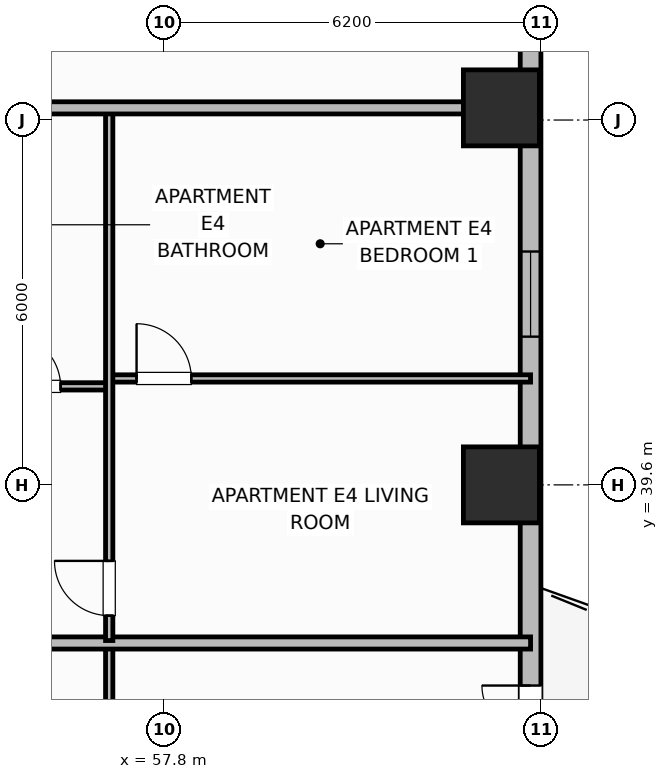
"""IFC4 building model, lengths in metres.
Left out: names, types, materials, properties, quantities, classifications, styles, units other than length and angle.
Written with IfcOpenShell. Run it as: python <this file> out.ifc"""

import sys

from ifc_helpers import new_model, si_unit, direction, frame, frame_2d, origin, origin_2d, place, context, subcontext, project, spatial, rectangle, extrude, element, fill, save


model = new_model("IFC4")
c1 = context("Model", 3, precision=1e-05, world=origin(), true_north=direction((0.0, 1.0)))
c2 = subcontext(c1, "Body", "Model", "MODEL_VIEW")
j1 = project(units=[si_unit("LENGTHUNIT", "METRE"), si_unit("PLANEANGLEUNIT", "RADIAN")], contexts=[c1])
p1 = place(None, origin())
s1 = spatial("IfcSite", under=j1, at=p1, CompositionType="ELEMENT")
p2 = place(p1, origin())
s2 = spatial("IfcBuilding", under=s1, at=p2, CompositionType="ELEMENT")
p3 = place(p2, frame((0.0, 0.0, 62.1)))
s3 = spatial("IfcBuildingStorey", under=s2, at=p3, CompositionType="ELEMENT", Elevation=62.1)
for number, where, z_axis, x_axis in (
    (1, (63.35, 39.6, 0.0), (0.0, 0.0, 1.0), (1.0, 0.0, 0.0)),
    (2, (63.35, 45.8, 0.0), (0.0, 0.0, 1.0), (1.0, 0.0, 0.0)),
):
    element("IfcColumn", number, at=place(p3, frame(where, z_axis=z_axis, x_axis=x_axis)), inside=s3, PredefinedType="COLUMN", context=c2, shape_type="SweptSolid", body=[
        extrude(rectangle(XDim=1.25, YDim=1.25, at=origin_2d()), origin(), (0.0, 0.0, 1.0), 3.7),
    ])
p4 = place(p3, frame((63.83, 32.6, 0.0), z_axis=(0.0, 0.0, 1.0), x_axis=(0.0, 1.0, 0.0)))
e3 = element("IfcWall", 3, at=p4, inside=s3, PredefinedType="SOLIDWALL", context=c2, shape_type="SweptSolid", body=[
    extrude(rectangle(XDim=14.8, YDim=0.34, at=frame_2d((7.4, 0.0))), origin(), (0.0, 0.0, 1.0), 2.7),
])
p5 = place(p4, frame((2.1, 0.0, 0.0)))
e4 = element("IfcOpeningElement", 4, at=p5, cuts=e3, PredefinedType="OPENING", context=c2, shape_type="SweptSolid", body=[
    extrude(rectangle(XDim=1.6, YDim=2.1, at=frame_2d((0.8, 1.05))), frame((0.0, 0.18, 0.0), z_axis=(0.0, -1.0, 0.0), x_axis=(1.0, 0.0, 0.0)), (0.0, 0.0, 1.0), 0.36),
])
p6 = place(p4, frame((9.438, 0.0, 0.73)))
e5 = element("IfcOpeningElement", 5, at=p6, cuts=e3, PredefinedType="OPENING", context=c2, shape_type="SweptSolid", body=[
    extrude(rectangle(XDim=1.4, YDim=1.85, at=frame_2d((0.7, 0.925))), frame((0.0, 0.18, 0.0), z_axis=(0.0, -1.0, 0.0), x_axis=(1.0, 0.0, 0.0)), (0.0, 0.0, 1.0), 0.36),
])
p7 = place(p3, frame((56.9, 26.64, 0.0), z_axis=(0.0, 0.0, 1.0), x_axis=(0.0, 1.0, 0.0)))
e6 = element("IfcWall", 6, at=p7, inside=s3, PredefinedType="PARTITIONING", context=c2, shape_type="SweptSolid", body=[
    extrude(rectangle(XDim=10.32, YDim=0.12, at=frame_2d((5.16, 0.0))), origin(), (0.0, 0.0, 1.0), 2.53),
])
p8 = place(p7, frame((0.56, 0.0, 0.0)))
e7 = element("IfcOpeningElement", 7, at=p8, cuts=e6, PredefinedType="OPENING", context=c2, shape_type="SweptSolid", body=[
    extrude(rectangle(XDim=0.9, YDim=2.1, at=frame_2d((0.45, 1.05))), frame((0.0, 0.07, 0.0), z_axis=(0.0, -1.0, 0.0), x_axis=(1.0, 0.0, 0.0)), (0.0, 0.0, 1.0), 0.14),
])
p9 = place(p3, frame((54.65, 37.0, 0.0), z_axis=(0.0, 0.0, 1.0), x_axis=(1.0, 0.0, 0.0)))
e8 = element("IfcWall", 8, at=p9, inside=s3, PredefinedType="PARTITIONING", context=c2, shape_type="SweptSolid", body=[
    extrude(rectangle(XDim=9.18, YDim=0.2, at=frame_2d((4.59, 0.0))), origin(), (0.0, 0.0, 1.0), 2.53),
])
p10 = place(p3, frame((54.65, 41.22, 0.0), z_axis=(0.0, 0.0, 1.0), x_axis=(1.0, 0.0, 0.0)))
e9 = element("IfcWall", 9, at=p10, inside=s3, PredefinedType="PARTITIONING", context=c2, shape_type="SweptSolid", body=[
    extrude(rectangle(XDim=2.25, YDim=0.12, at=frame_2d((1.125, 0.0))), origin(), (0.0, 0.0, 1.0), 2.53),
])
p11 = place(p10, frame((0.6, 0.0, 0.0)))
e10 = element("IfcOpeningElement", 10, at=p11, cuts=e9, PredefinedType="OPENING", context=c2, shape_type="SweptSolid", body=[
    extrude(rectangle(XDim=0.85, YDim=2.1, at=frame_2d((0.425, 1.05))), frame((0.0, 0.07, 0.0), z_axis=(0.0, -1.0, 0.0), x_axis=(1.0, 0.0, 0.0)), (0.0, 0.0, 1.0), 0.14),
])
p12 = place(p3, frame((56.9, 41.35, 0.0), z_axis=(0.0, 0.0, 1.0), x_axis=(1.0, 0.0, 0.0)))
e11 = element("IfcWall", 11, at=p12, inside=s3, PredefinedType="PARTITIONING", context=c2, shape_type="SweptSolid", body=[
    extrude(rectangle(XDim=6.93, YDim=0.12, at=frame_2d((3.465, 0.0))), origin(), (0.0, 0.0, 1.0), 2.53),
])
p13 = place(p12, frame((0.45, 0.0, 0.0)))
e12 = element("IfcOpeningElement", 12, at=p13, cuts=e11, PredefinedType="OPENING", context=c2, shape_type="SweptSolid", body=[
    extrude(rectangle(XDim=0.9, YDim=2.1, at=frame_2d((0.45, 1.05))), frame((0.0, 0.07, 0.0), z_axis=(0.0, -1.0, 0.0), x_axis=(1.0, 0.0, 0.0)), (0.0, 0.0, 1.0), 0.14),
])
p14 = place(p3, frame((56.9, 37.04, 0.0), z_axis=(0.0, 0.0, 1.0), x_axis=(0.0, 1.0, 0.0)))
e13 = element("IfcWall", 13, at=p14, inside=s3, PredefinedType="PARTITIONING", context=c2, shape_type="SweptSolid", body=[
    extrude(rectangle(XDim=8.72, YDim=0.12, at=frame_2d((4.36, 0.0))), origin(), (0.0, 0.0, 1.0), 2.53),
])
p15 = place(p14, frame((0.41, 0.0, 0.0)))
e14 = element("IfcOpeningElement", 14, at=p15, cuts=e13, PredefinedType="OPENING", context=c2, shape_type="SweptSolid", body=[
    extrude(rectangle(XDim=0.9, YDim=2.1, at=frame_2d((0.45, 1.05))), frame((0.0, 0.07, 0.0), z_axis=(0.0, -1.0, 0.0), x_axis=(1.0, 0.0, 0.0)), (0.0, 0.0, 1.0), 0.14),
])
p16 = place(p3, frame((54.65, 45.8, 0.0), z_axis=(0.0, 0.0, 1.0), x_axis=(1.0, 0.0, 0.0)))
e15 = element("IfcWall", 15, at=p16, inside=s3, PredefinedType="PARTITIONING", context=c2, shape_type="SweptSolid", body=[
    extrude(rectangle(XDim=8.76, YDim=0.2, at=frame_2d((4.38, 0.0))), origin(), (0.0, 0.0, 1.0), 2.53),
])
p17 = place(p5, origin())
e16 = element("IfcDoor", 16, at=p17, inside=s3, OperationType="DOUBLE_DOOR_SINGLE_SWING", PredefinedType="DOOR", context=c2, shape_type="SweptSolid", body=[
    extrude(rectangle(XDim=1.6, YDim=2.1, at=frame_2d((0.8, 1.05))), frame((0.0, 0.025, 0.0), z_axis=(0.0, -1.0, 0.0), x_axis=(1.0, 0.0, 0.0)), (0.0, 0.0, 1.0), 0.05),
])
fill(e4, e16)
p18 = place(p6, origin())
e17 = element("IfcWindow", 17, at=p18, inside=s3, PartitioningType="SINGLE_PANEL", PredefinedType="WINDOW", context=c2, shape_type="SweptSolid", body=[
    extrude(rectangle(XDim=1.4, YDim=1.85, at=frame_2d((0.7, 0.925))), frame((0.0, 0.03, 0.0), z_axis=(0.0, -1.0, 0.0), x_axis=(1.0, 0.0, 0.0)), (0.0, 0.0, 1.0), 0.06),
])
fill(e5, e17)
p19 = place(p11, origin())
e18 = element("IfcDoor", 18, at=p19, inside=s3, OperationType="SINGLE_SWING_LEFT", PredefinedType="DOOR", context=c2, shape_type="SweptSolid", body=[
    extrude(rectangle(XDim=0.85, YDim=2.1, at=frame_2d((0.425, 1.05))), frame((0.0, 0.025, 0.0), z_axis=(0.0, -1.0, 0.0), x_axis=(1.0, 0.0, 0.0)), (0.0, 0.0, 1.0), 0.05),
])
fill(e10, e18)
p20 = place(p13, origin())
e19 = element("IfcDoor", 19, at=p20, inside=s3, OperationType="SINGLE_SWING_LEFT", PredefinedType="DOOR", context=c2, shape_type="SweptSolid", body=[
    extrude(rectangle(XDim=0.9, YDim=2.1, at=frame_2d((0.45, 1.05))), frame((0.0, 0.025, 0.0), z_axis=(0.0, -1.0, 0.0), x_axis=(1.0, 0.0, 0.0)), (0.0, 0.0, 1.0), 0.05),
])
fill(e12, e19)
p21 = place(p15, origin())
e20 = element("IfcDoor", 20, at=p21, inside=s3, OperationType="SINGLE_SWING_RIGHT", PredefinedType="DOOR", context=c2, shape_type="SweptSolid", body=[
    extrude(rectangle(XDim=0.9, YDim=2.1, at=frame_2d((0.45, 1.05))), frame((0.0, 0.025, 0.0), z_axis=(0.0, -1.0, 0.0), x_axis=(1.0, 0.0, 0.0)), (0.0, 0.0, 1.0), 0.05),
])
fill(e14, e20)
save(model, sys.argv[1])
